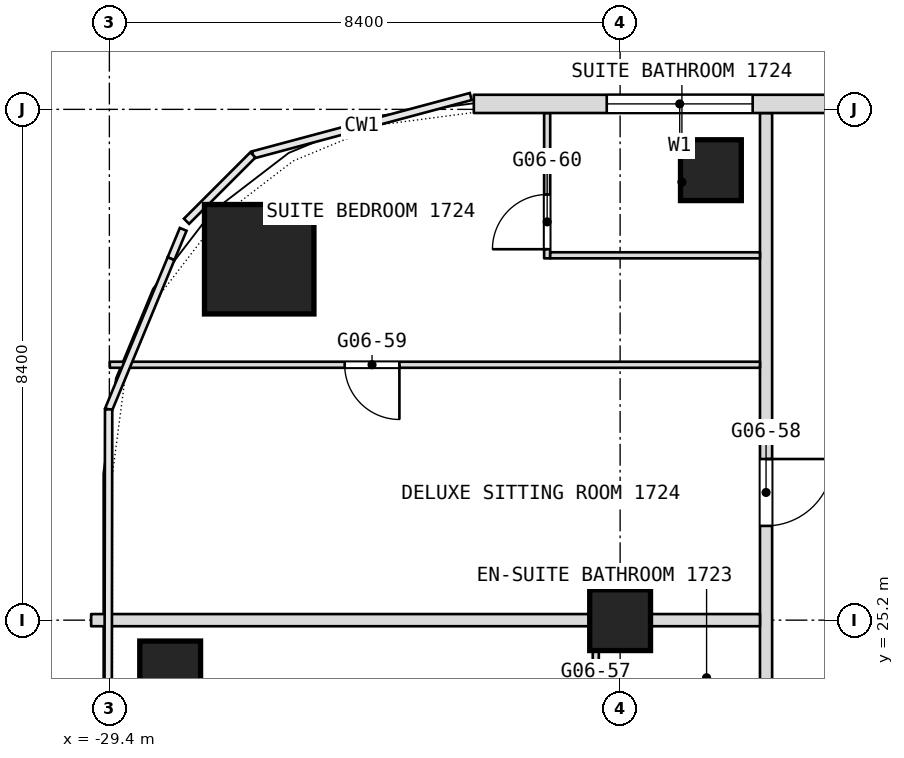
"""IFC4 building model, lengths in metres.
Left out: names, types, materials, properties, quantities, classifications, styles, units other than length and angle.
Written with IfcOpenShell. Run it as: python <this file> out.ifc"""

import sys

from ifc_helpers import new_model, si_unit, direction, frame, frame_2d, origin, origin_2d, place, context, subcontext, project, spatial, rectangle, extrude, element, fill, save


model = new_model("IFC4")
c1 = context("Model", 3, precision=1e-05, world=origin(), true_north=direction((0.0, 1.0)))
c2 = subcontext(c1, "Body", "Model", "MODEL_VIEW")
j1 = project(units=[si_unit("LENGTHUNIT", "METRE"), si_unit("PLANEANGLEUNIT", "RADIAN")], contexts=[c1])
p1 = place(None, origin())
s1 = spatial("IfcSite", under=j1, at=p1, CompositionType="ELEMENT")
p2 = place(p1, origin())
s2 = spatial("IfcBuilding", under=s1, at=p2, CompositionType="ELEMENT")
p3 = place(p2, frame((0.0, 0.0, 76.1)))
s3 = spatial("IfcBuildingStorey", under=s2, at=p3, CompositionType="ELEMENT", Elevation=76.1)
p4 = place(p3, frame((-26.936, 31.135, 0.0), z_axis=(0.0, 0.0, 1.0), x_axis=(1.0, 0.0, 0.0)))
e1 = element("IfcColumn", 1, at=p4, inside=s3, PredefinedType="COLUMN", context=c2, shape_type="SweptSolid", body=[
    extrude(rectangle(XDim=1.8, YDim=1.8, at=origin_2d()), origin(), (0.0, 0.0, 1.0), 3.6),
])
for number, where, z_axis, x_axis in (
    (2, (-21.0, 25.2, 0.0), (0.0, 0.0, 1.0), (1.0, 0.0, 0.0)),
    (3, (-28.4, 24.356, 0.0), (0.0, 0.0, 1.0), (1.0, 0.0, 0.0)),
    (4, (-19.507, 32.6, 0.0), (0.0, 0.0, 1.0), (1.0, 0.0, 0.0)),
):
    element("IfcColumn", number, at=place(p3, frame(where, z_axis=z_axis, x_axis=x_axis)), inside=s3, PredefinedType="COLUMN", context=c2, shape_type="SweptSolid", body=[
        extrude(rectangle(XDim=1.0, YDim=1.0, at=origin_2d()), origin(), (0.0, 0.0, 1.0), 3.6),
    ])
p5 = place(p3, frame((-18.6, 18.5, 0.0), z_axis=(0.0, 0.0, 1.0), x_axis=(0.0, 1.0, 0.0)))
e5 = element("IfcWall", 5, at=p5, inside=s3, PredefinedType="PARTITIONING", context=c2, shape_type="SweptSolid", body=[
    extrude(rectangle(XDim=15.04, YDim=0.2, at=frame_2d((7.52, 0.0))), origin(), (0.0, 0.0, 1.0), 3.34),
])
p6 = place(p5, frame((2.9, 0.0, 0.0)))
e6 = element("IfcOpeningElement", 6, at=p6, cuts=e5, PredefinedType="OPENING", context=c2, shape_type="SweptSolid", body=[
    extrude(rectangle(XDim=1.0, YDim=2.1, at=frame_2d((0.5, 1.05))), frame((0.0, 0.1, 0.0), z_axis=(0.0, -1.0, 0.0), x_axis=(1.0, 0.0, 0.0)), (0.0, 0.0, 1.0), 0.2),
])
p7 = place(p5, frame((8.25, 0.0, 0.0)))
e7 = element("IfcOpeningElement", 7, at=p7, cuts=e5, PredefinedType="OPENING", context=c2, shape_type="SweptSolid", body=[
    extrude(rectangle(XDim=1.1, YDim=2.1, at=frame_2d((0.55, 1.05))), frame((0.0, 0.1, 0.0), z_axis=(0.0, -1.0, 0.0), x_axis=(1.0, 0.0, 0.0)), (0.0, 0.0, 1.0), 0.2),
])
p8 = place(p3, frame((-21.4, 22.75, 0.0), z_axis=(0.0, 0.0, 1.0), x_axis=(0.0, 1.0, 0.0)))
e8 = element("IfcWall", 8, at=p8, inside=s3, PredefinedType="PARTITIONING", context=c2, shape_type="SweptSolid", body=[
    extrude(rectangle(XDim=2.55, YDim=0.1, at=frame_2d((1.275, 0.0))), origin(), (0.0, 0.0, 1.0), 3.34),
])
p9 = place(p8, frame((0.15, 0.0, 0.0)))
e9 = element("IfcOpeningElement", 9, at=p9, cuts=e8, PredefinedType="OPENING", context=c2, shape_type="SweptSolid", body=[
    extrude(rectangle(XDim=0.9, YDim=2.1, at=frame_2d((0.45, 1.05))), frame((0.0, 0.05, 0.0), z_axis=(0.0, -1.0, 0.0), x_axis=(1.0, 0.0, 0.0)), (0.0, 0.0, 1.0), 0.1),
])
p10 = place(p3, frame((-22.2, 31.15, 0.0), z_axis=(0.0, 0.0, 1.0), x_axis=(0.0, 1.0, 0.0)))
e10 = element("IfcWall", 10, at=p10, inside=s3, PredefinedType="PARTITIONING", context=c2, shape_type="SweptSolid", body=[
    extrude(rectangle(XDim=2.39, YDim=0.1, at=frame_2d((1.195, 0.0))), origin(), (0.0, 0.0, 1.0), 3.34),
])
p11 = place(p10, frame((0.15, 0.0, 0.0)))
e11 = element("IfcOpeningElement", 11, at=p11, cuts=e10, PredefinedType="OPENING", context=c2, shape_type="SweptSolid", body=[
    extrude(rectangle(XDim=0.9, YDim=2.1, at=frame_2d((0.45, 1.05))), frame((0.0, 0.05, 0.0), z_axis=(0.0, -1.0, 0.0), x_axis=(1.0, 0.0, 0.0)), (0.0, 0.0, 1.0), 0.1),
])
p12 = place(p3, frame((-29.7, 25.2, 0.0), z_axis=(0.0, 0.0, 1.0), x_axis=(1.0, 0.0, 0.0)))
e12 = element("IfcWall", 12, at=p12, inside=s3, PredefinedType="PARTITIONING", context=c2, shape_type="SweptSolid", body=[
    extrude(rectangle(XDim=11.0, YDim=0.2, at=frame_2d((5.5, 0.0))), origin(), (0.0, 0.0, 1.0), 2.84),
])
p13 = place(p3, frame((-29.393, 29.4, 0.0), z_axis=(0.0, 0.0, 1.0), x_axis=(1.0, 0.0, 0.0)))
e13 = element("IfcWall", 13, at=p13, inside=s3, PredefinedType="PARTITIONING", context=c2, shape_type="SweptSolid", body=[
    extrude(rectangle(XDim=10.693, YDim=0.1, at=frame_2d((5.347, 0.0))), origin(), (0.0, 0.0, 1.0), 3.34),
])
p14 = place(p13, frame((3.863, 0.0, 0.0)))
e14 = element("IfcOpeningElement", 14, at=p14, cuts=e13, PredefinedType="OPENING", context=c2, shape_type="SweptSolid", body=[
    extrude(rectangle(XDim=0.9, YDim=2.1, at=frame_2d((0.45, 1.05))), frame((0.0, 0.05, 0.0), z_axis=(0.0, -1.0, 0.0), x_axis=(1.0, 0.0, 0.0)), (0.0, 0.0, 1.0), 0.1),
])
p15 = place(p3, frame((-22.15, 31.2, 0.0), z_axis=(0.0, 0.0, 1.0), x_axis=(1.0, 0.0, 0.0)))
e15 = element("IfcWall", 15, at=p15, inside=s3, PredefinedType="PARTITIONING", context=c2, shape_type="SweptSolid", body=[
    extrude(rectangle(XDim=3.45, YDim=0.1, at=frame_2d((1.725, 0.0))), origin(), (0.0, 0.0, 1.0), 3.34),
])
p16 = place(p3, frame((23.406, 33.69, 0.0), z_axis=(0.0, 0.0, 1.0), x_axis=(-1.0, 0.0, 0.0)))
e16 = element("IfcWall", 16, at=p16, inside=s3, PredefinedType="NOTDEFINED", context=c2, shape_type="SweptSolid", body=[
    extrude(rectangle(XDim=46.812, YDim=0.3, at=frame_2d((23.406, 0.0))), origin(), (0.0, 0.0, 1.0), 3.6),
])
p17 = place(p16, frame((2.186, 0.0, 0.9)))
e17 = element("IfcOpeningElement", 17, at=p17, cuts=e16, PredefinedType="OPENING", context=c2, shape_type="SweptSolid", body=[
    extrude(rectangle(XDim=2.4, YDim=2.1, at=frame_2d((1.2, 1.05))), frame((0.0, 0.15, 0.0), z_axis=(0.0, -1.0, 0.0), x_axis=(1.0, 0.0, 0.0)), (0.0, 0.0, 1.0), 0.3),
])
p18 = place(p16, frame((7.506, 0.0, 0.9)))
e18 = element("IfcOpeningElement", 18, at=p18, cuts=e16, PredefinedType="OPENING", context=c2, shape_type="SweptSolid", body=[
    extrude(rectangle(XDim=2.4, YDim=2.1, at=frame_2d((1.2, 1.05))), frame((0.0, 0.15, 0.0), z_axis=(0.0, -1.0, 0.0), x_axis=(1.0, 0.0, 0.0)), (0.0, 0.0, 1.0), 0.3),
])
p19 = place(p16, frame((11.706, 0.0, 0.9)))
e19 = element("IfcOpeningElement", 19, at=p19, cuts=e16, PredefinedType="OPENING", context=c2, shape_type="SweptSolid", body=[
    extrude(rectangle(XDim=2.4, YDim=2.1, at=frame_2d((1.2, 1.05))), frame((0.0, 0.15, 0.0), z_axis=(0.0, -1.0, 0.0), x_axis=(1.0, 0.0, 0.0)), (0.0, 0.0, 1.0), 0.3),
])
p20 = place(p16, frame((15.906, 0.0, 0.9)))
e20 = element("IfcOpeningElement", 20, at=p20, cuts=e16, PredefinedType="OPENING", context=c2, shape_type="SweptSolid", body=[
    extrude(rectangle(XDim=2.4, YDim=2.1, at=frame_2d((1.2, 1.05))), frame((0.0, 0.15, 0.0), z_axis=(0.0, -1.0, 0.0), x_axis=(1.0, 0.0, 0.0)), (0.0, 0.0, 1.0), 0.3),
])
p21 = place(p16, frame((20.106, 0.0, 0.9)))
e21 = element("IfcOpeningElement", 21, at=p21, cuts=e16, PredefinedType="OPENING", context=c2, shape_type="SweptSolid", body=[
    extrude(rectangle(XDim=2.4, YDim=2.1, at=frame_2d((1.2, 1.05))), frame((0.0, 0.15, 0.0), z_axis=(0.0, -1.0, 0.0), x_axis=(1.0, 0.0, 0.0)), (0.0, 0.0, 1.0), 0.3),
])
p22 = place(p16, frame((24.306, 0.0, 0.9)))
e22 = element("IfcOpeningElement", 22, at=p22, cuts=e16, PredefinedType="OPENING", context=c2, shape_type="SweptSolid", body=[
    extrude(rectangle(XDim=2.4, YDim=2.1, at=frame_2d((1.2, 1.05))), frame((0.0, 0.15, 0.0), z_axis=(0.0, -1.0, 0.0), x_axis=(1.0, 0.0, 0.0)), (0.0, 0.0, 1.0), 0.3),
])
p23 = place(p16, frame((28.506, 0.0, 0.9)))
e23 = element("IfcOpeningElement", 23, at=p23, cuts=e16, PredefinedType="OPENING", context=c2, shape_type="SweptSolid", body=[
    extrude(rectangle(XDim=2.4, YDim=2.1, at=frame_2d((1.2, 1.05))), frame((0.0, 0.15, 0.0), z_axis=(0.0, -1.0, 0.0), x_axis=(1.0, 0.0, 0.0)), (0.0, 0.0, 1.0), 0.3),
])
p24 = place(p16, frame((32.706, 0.0, 0.9)))
e24 = element("IfcOpeningElement", 24, at=p24, cuts=e16, PredefinedType="OPENING", context=c2, shape_type="SweptSolid", body=[
    extrude(rectangle(XDim=2.4, YDim=2.1, at=frame_2d((1.2, 1.05))), frame((0.0, 0.15, 0.0), z_axis=(0.0, -1.0, 0.0), x_axis=(1.0, 0.0, 0.0)), (0.0, 0.0, 1.0), 0.3),
])
p25 = place(p16, frame((36.906, 0.0, 0.9)))
e25 = element("IfcOpeningElement", 25, at=p25, cuts=e16, PredefinedType="OPENING", context=c2, shape_type="SweptSolid", body=[
    extrude(rectangle(XDim=2.4, YDim=2.1, at=frame_2d((1.2, 1.05))), frame((0.0, 0.15, 0.0), z_axis=(0.0, -1.0, 0.0), x_axis=(1.0, 0.0, 0.0)), (0.0, 0.0, 1.0), 0.3),
])
p26 = place(p16, frame((42.226, 0.0, 0.9)))
e26 = element("IfcOpeningElement", 26, at=p26, cuts=e16, PredefinedType="OPENING", context=c2, shape_type="SweptSolid", body=[
    extrude(rectangle(XDim=2.4, YDim=2.1, at=frame_2d((1.2, 1.05))), frame((0.0, 0.15, 0.0), z_axis=(0.0, -1.0, 0.0), x_axis=(1.0, 0.0, 0.0)), (0.0, 0.0, 1.0), 0.3),
])
p27 = place(p7, origin())
e27 = element("IfcDoor", 27, at=p27, inside=s3, OperationType="SINGLE_SWING_LEFT", PredefinedType="DOOR", context=c2, shape_type="SweptSolid", body=[
    extrude(rectangle(XDim=1.1, YDim=2.1, at=frame_2d((0.55, 1.05))), frame((0.0, 0.025, 0.0), z_axis=(0.0, -1.0, 0.0), x_axis=(1.0, 0.0, 0.0)), (0.0, 0.0, 1.0), 0.05),
])
fill(e7, e27)
p28 = place(p11, origin())
e28 = element("IfcDoor", 28, at=p28, inside=s3, OperationType="SINGLE_SWING_RIGHT", PredefinedType="DOOR", context=c2, shape_type="SweptSolid", body=[
    extrude(rectangle(XDim=0.9, YDim=2.1, at=frame_2d((0.45, 1.05))), frame((0.0, 0.025, 0.0), z_axis=(0.0, -1.0, 0.0), x_axis=(1.0, 0.0, 0.0)), (0.0, 0.0, 1.0), 0.05),
])
fill(e11, e28)
p29 = place(p14, origin())
e29 = element("IfcDoor", 29, at=p29, inside=s3, OperationType="SINGLE_SWING_LEFT", PredefinedType="DOOR", context=c2, shape_type="SweptSolid", body=[
    extrude(rectangle(XDim=0.9, YDim=2.1, at=frame_2d((0.45, 1.05))), frame((0.0, 0.025, 0.0), z_axis=(0.0, -1.0, 0.0), x_axis=(1.0, 0.0, 0.0)), (0.0, 0.0, 1.0), 0.05),
])
fill(e14, e29)
p30 = place(p26, origin())
e30 = element("IfcWindow", 30, at=p30, inside=s3, PartitioningType="SINGLE_PANEL", PredefinedType="WINDOW", context=c2, shape_type="SweptSolid", body=[
    extrude(rectangle(XDim=2.4, YDim=2.1, at=frame_2d((1.2, 1.05))), frame((0.0, 0.03, 0.0), z_axis=(0.0, -1.0, 0.0), x_axis=(1.0, 0.0, 0.0)), (0.0, 0.0, 1.0), 0.06),
])
fill(e26, e30)
save(model, sys.argv[1])
